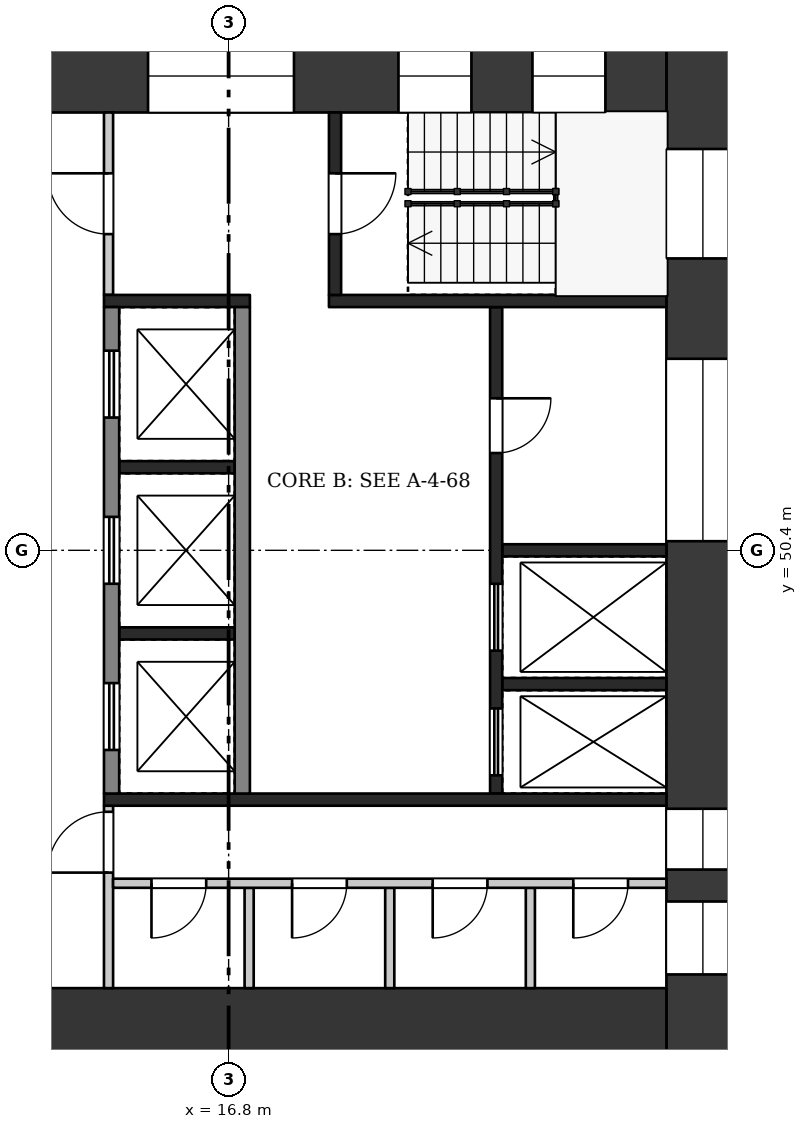
"""IFC4 building model, lengths in metres.
Left out: names, types, materials, properties, quantities, classifications, styles, units other than length and angle.
Written with IfcOpenShell. Run it as: python <this file> out.ifc"""

import sys

from ifc_helpers import new_model, si_unit, direction, frame, frame_2d, origin, place, context, subcontext, project, spatial, rectangle, extrude, element, fill, save


model = new_model("IFC4")
c1 = context("Model", 3, precision=1e-05, world=origin(), true_north=direction((0.0, 1.0)))
c2 = subcontext(c1, "Body", "Model", "MODEL_VIEW")
j1 = project(units=[si_unit("LENGTHUNIT", "METRE"), si_unit("PLANEANGLEUNIT", "RADIAN")], contexts=[c1])
p1 = place(None, origin())
s1 = spatial("IfcSite", under=j1, at=p1, CompositionType="ELEMENT")
p2 = place(p1, origin())
s2 = spatial("IfcBuilding", under=s1, at=p2, CompositionType="ELEMENT")
p3 = place(p2, frame((0.0, 0.0, 235.2)))
s3 = spatial("IfcBuildingStorey", under=s2, at=p3, CompositionType="ELEMENT", Elevation=235.2)
p4 = place(p3, frame((24.6, 58.8, 0.0), z_axis=(0.0, 0.0, 1.0), x_axis=(0.0, -1.0, 0.0)))
e1 = element("IfcWall", 1, at=p4, inside=s3, PredefinedType="SHEAR", context=c2, shape_type="SweptSolid", body=[
    extrude(rectangle(XDim=16.8, YDim=1.2, at=frame_2d((8.4, 0.0))), origin(), (0.0, 0.0, 1.0), 3.22),
])
p5 = place(p4, frame((1.8, 0.0, 0.5)))
e2 = element("IfcOpeningElement", 2, at=p5, cuts=e1, PredefinedType="OPENING", context=c2, shape_type="SweptSolid", body=[
    extrude(rectangle(XDim=1.8, YDim=2.4, at=frame_2d((0.9, 1.2))), frame((0.0, 0.61, 0.0), z_axis=(0.0, -1.0, 0.0), x_axis=(1.0, 0.0, 0.0)), (0.0, 0.0, 1.0), 1.22),
])
p6 = place(p4, frame((5.25, 0.0, 1.6)))
e3 = element("IfcOpeningElement", 3, at=p6, cuts=e1, PredefinedType="OPENING", context=c2, shape_type="SweptSolid", body=[
    extrude(rectangle(XDim=3.0, YDim=1.2, at=frame_2d((1.5, 0.6))), frame((0.0, 0.61, 0.0), z_axis=(0.0, -1.0, 0.0), x_axis=(1.0, 0.0, 0.0)), (0.0, 0.0, 1.0), 1.22),
])
p7 = place(p4, frame((12.65, 0.0, 0.6)))
e4 = element("IfcOpeningElement", 4, at=p7, cuts=e1, PredefinedType="OPENING", context=c2, shape_type="SweptSolid", body=[
    extrude(rectangle(XDim=1.0, YDim=2.1, at=frame_2d((0.5, 1.05))), frame((0.0, 0.61, 0.0), z_axis=(0.0, -1.0, 0.0), x_axis=(1.0, 0.0, 0.0)), (0.0, 0.0, 1.0), 1.22),
])
p8 = place(p4, frame((14.175, 0.0, 1.6)))
e5 = element("IfcOpeningElement", 5, at=p8, cuts=e1, PredefinedType="OPENING", context=c2, shape_type="SweptSolid", body=[
    extrude(rectangle(XDim=1.2, YDim=1.2, at=frame_2d((0.6, 0.6))), frame((0.0, 0.61, 0.0), z_axis=(0.0, -1.0, 0.0), x_axis=(1.0, 0.0, 0.0)), (0.0, 0.0, 1.0), 1.22),
])
p9 = place(p3, frame((9.6, 58.2, 0.0), z_axis=(0.0, 0.0, 1.0), x_axis=(1.0, 0.0, 0.0)))
e6 = element("IfcWall", 6, at=p9, inside=s3, PredefinedType="SHEAR", context=c2, shape_type="SweptSolid", body=[
    extrude(rectangle(XDim=14.4, YDim=1.2, at=frame_2d((7.2, 0.0))), origin(), (0.0, 0.0, 1.0), 3.22),
])
p10 = place(p9, frame((1.105, 0.0, 0.6)))
e7 = element("IfcOpeningElement", 7, at=p10, cuts=e6, PredefinedType="OPENING", context=c2, shape_type="SweptSolid", body=[
    extrude(rectangle(XDim=3.0, YDim=2.1, at=frame_2d((1.5, 1.05))), frame((0.0, 0.61, 0.0), z_axis=(0.0, -1.0, 0.0), x_axis=(1.0, 0.0, 0.0)), (0.0, 0.0, 1.0), 1.22),
])
p11 = place(p9, frame((5.875, 0.0, 0.6)))
e8 = element("IfcOpeningElement", 8, at=p11, cuts=e6, PredefinedType="OPENING", context=c2, shape_type="SweptSolid", body=[
    extrude(rectangle(XDim=2.4, YDim=2.1, at=frame_2d((1.2, 1.05))), frame((0.0, 0.61, 0.0), z_axis=(0.0, -1.0, 0.0), x_axis=(1.0, 0.0, 0.0)), (0.0, 0.0, 1.0), 1.22),
])
p12 = place(p9, frame((9.993, 0.0, 0.5)))
e9 = element("IfcOpeningElement", 9, at=p12, cuts=e6, PredefinedType="OPENING", context=c2, shape_type="SweptSolid", body=[
    extrude(rectangle(XDim=1.2, YDim=2.4, at=frame_2d((0.6, 1.2))), frame((0.0, 0.61, 0.0), z_axis=(0.0, -1.0, 0.0), x_axis=(1.0, 0.0, 0.0)), (0.0, 0.0, 1.0), 1.22),
])
p13 = place(p9, frame((12.197, 0.0, 0.5)))
e10 = element("IfcOpeningElement", 10, at=p13, cuts=e6, PredefinedType="OPENING", context=c2, shape_type="SweptSolid", body=[
    extrude(rectangle(XDim=1.2, YDim=2.4, at=frame_2d((0.6, 1.2))), frame((0.0, 0.61, 0.0), z_axis=(0.0, -1.0, 0.0), x_axis=(1.0, 0.0, 0.0)), (0.0, 0.0, 1.0), 1.22),
])
p14 = place(p3, frame((9.6, 42.6, 0.0), z_axis=(0.0, 0.0, 1.0), x_axis=(1.0, 0.0, 0.0)))
e11 = element("IfcWall", 11, at=p14, inside=s3, PredefinedType="SHEAR", context=c2, shape_type="SweptSolid", body=[
    extrude(rectangle(XDim=14.4, YDim=1.2, at=frame_2d((7.2, 0.0))), origin(), (0.0, 0.0, 1.0), 3.22),
])
p15 = place(p14, frame((2.1, 0.0, 0.0)))
e12 = element("IfcOpeningElement", 12, at=p15, cuts=e11, PredefinedType="OPENING", context=c2, shape_type="SweptSolid", body=[
    extrude(rectangle(XDim=1.8, YDim=2.1, at=frame_2d((0.9, 1.05))), frame((0.0, 0.61, 0.0), z_axis=(0.0, -1.0, 0.0), x_axis=(1.0, 0.0, 0.0)), (0.0, 0.0, 1.0), 1.22),
])
for number, where, z_axis, x_axis in (
    (13, (15.0, 51.767, 0.0), (0.0, 0.0, 1.0), (1.0, 0.0, 0.0)),
    (14, (15.0, 49.033, 0.0), (0.0, 0.0, 1.0), (1.0, 0.0, 0.0)),
):
    element("IfcWall", number, at=place(p3, frame(where, z_axis=z_axis, x_axis=x_axis)), inside=s3, PredefinedType="SHEAR", context=c2, shape_type="SweptSolid", body=[
        extrude(rectangle(XDim=1.9, YDim=0.2, at=frame_2d((0.95, 0.0))), origin(), (0.0, 0.0, 1.0), 3.22),
    ])
p16 = place(p3, frame((14.875, 54.4, 0.0), z_axis=(0.0, 0.0, 1.0), x_axis=(0.0, -1.0, 0.0)))
e15 = element("IfcWall", 15, at=p16, inside=s3, PredefinedType="SHEAR", context=c2, shape_type="SweptSolid", body=[
    extrude(rectangle(XDim=8.0, YDim=0.25, at=frame_2d((4.0, 0.0))), origin(), (0.0, 0.0, 1.0), 3.22),
])
p17 = place(p16, frame((0.717, 0.0, 0.0)))
e16 = element("IfcOpeningElement", 16, at=p17, cuts=e15, PredefinedType="OPENING", context=c2, shape_type="SweptSolid", body=[
    extrude(rectangle(XDim=1.1, YDim=2.1, at=frame_2d((0.55, 1.05))), frame((0.0, 0.135, 0.0), z_axis=(0.0, -1.0, 0.0), x_axis=(1.0, 0.0, 0.0)), (0.0, 0.0, 1.0), 0.27),
])
p18 = place(p16, frame((3.45, 0.0, 0.0)))
e17 = element("IfcOpeningElement", 17, at=p18, cuts=e15, PredefinedType="OPENING", context=c2, shape_type="SweptSolid", body=[
    extrude(rectangle(XDim=1.1, YDim=2.1, at=frame_2d((0.55, 1.05))), frame((0.0, 0.135, 0.0), z_axis=(0.0, -1.0, 0.0), x_axis=(1.0, 0.0, 0.0)), (0.0, 0.0, 1.0), 0.27),
])
p19 = place(p16, frame((6.183, 0.0, 0.0)))
e18 = element("IfcOpeningElement", 18, at=p19, cuts=e15, PredefinedType="OPENING", context=c2, shape_type="SweptSolid", body=[
    extrude(rectangle(XDim=1.1, YDim=2.1, at=frame_2d((0.55, 1.05))), frame((0.0, 0.135, 0.0), z_axis=(0.0, -1.0, 0.0), x_axis=(1.0, 0.0, 0.0)), (0.0, 0.0, 1.0), 0.27),
])
p20 = place(p3, frame((17.025, 54.4, 0.0), z_axis=(0.0, 0.0, 1.0), x_axis=(0.0, -1.0, 0.0)))
e19 = element("IfcWall", 19, at=p20, inside=s3, PredefinedType="SHEAR", context=c2, shape_type="SweptSolid", body=[
    extrude(rectangle(XDim=8.0, YDim=0.25, at=frame_2d((4.0, 0.0))), origin(), (0.0, 0.0, 1.0), 3.22),
])
for number, where, z_axis, x_axis in (
    (20, (21.3, 50.4, 0.0), (0.0, 0.0, 1.0), (1.0, 0.0, 0.0)),
    (21, (21.3, 48.2, 0.0), (0.0, 0.0, 1.0), (1.0, 0.0, 0.0)),
):
    element("IfcWall", number, at=place(p3, frame(where, z_axis=z_axis, x_axis=x_axis)), inside=s3, PredefinedType="SHEAR", context=c2, shape_type="SweptSolid", body=[
        extrude(rectangle(XDim=2.7, YDim=0.2, at=frame_2d((1.35, 0.0))), origin(), (0.0, 0.0, 1.0), 3.22),
    ])
p21 = place(p3, frame((21.2, 54.4, 0.0), z_axis=(0.0, 0.0, 1.0), x_axis=(0.0, -1.0, 0.0)))
e22 = element("IfcWall", 22, at=p21, inside=s3, PredefinedType="SHEAR", context=c2, shape_type="SweptSolid", body=[
    extrude(rectangle(XDim=8.0, YDim=0.2, at=frame_2d((4.0, 0.0))), origin(), (0.0, 0.0, 1.0), 3.22),
])
p22 = place(p21, frame((1.5, 0.0, 0.0)))
e23 = element("IfcOpeningElement", 23, at=p22, cuts=e22, PredefinedType="OPENING", context=c2, shape_type="SweptSolid", body=[
    extrude(rectangle(XDim=0.9, YDim=2.1, at=frame_2d((0.45, 1.05))), frame((0.0, 0.11, 0.0), z_axis=(0.0, -1.0, 0.0), x_axis=(1.0, 0.0, 0.0)), (0.0, 0.0, 1.0), 0.22),
])
p23 = place(p21, frame((4.55, 0.0, 0.0)))
e24 = element("IfcOpeningElement", 24, at=p23, cuts=e22, PredefinedType="OPENING", context=c2, shape_type="SweptSolid", body=[
    extrude(rectangle(XDim=1.1, YDim=2.1, at=frame_2d((0.55, 1.05))), frame((0.0, 0.11, 0.0), z_axis=(0.0, -1.0, 0.0), x_axis=(1.0, 0.0, 0.0)), (0.0, 0.0, 1.0), 0.22),
])
p24 = place(p21, frame((6.6, 0.0, 0.0)))
e25 = element("IfcOpeningElement", 25, at=p24, cuts=e22, PredefinedType="OPENING", context=c2, shape_type="SweptSolid", body=[
    extrude(rectangle(XDim=1.1, YDim=2.1, at=frame_2d((0.55, 1.05))), frame((0.0, 0.11, 0.0), z_axis=(0.0, -1.0, 0.0), x_axis=(1.0, 0.0, 0.0)), (0.0, 0.0, 1.0), 0.22),
])
p25 = place(p3, frame((14.75, 54.5, 0.0), z_axis=(0.0, 0.0, 1.0), x_axis=(1.0, 0.0, 0.0)))
e26 = element("IfcWall", 26, at=p25, inside=s3, PredefinedType="SHEAR", context=c2, shape_type="SweptSolid", body=[
    extrude(rectangle(XDim=2.4, YDim=0.2, at=frame_2d((1.2, 0.0))), origin(), (0.0, 0.0, 1.0), 3.22),
])
p26 = place(p3, frame((18.45, 54.5, 0.0), z_axis=(0.0, 0.0, 1.0), x_axis=(1.0, 0.0, 0.0)))
e27 = element("IfcWall", 27, at=p26, inside=s3, PredefinedType="SHEAR", context=c2, shape_type="SweptSolid", body=[
    extrude(rectangle(XDim=5.55, YDim=0.2, at=frame_2d((2.775, 0.0))), origin(), (0.0, 0.0, 1.0), 3.22),
])
p27 = place(p3, frame((14.825, 57.6, 0.0), z_axis=(0.0, 0.0, 1.0), x_axis=(0.0, -1.0, 0.0)))
e28 = element("IfcWall", 28, at=p27, inside=s3, PredefinedType="PARTITIONING", context=c2, shape_type="SweptSolid", body=[
    extrude(rectangle(XDim=3.0, YDim=0.15, at=frame_2d((1.5, 0.0))), origin(), (0.0, 0.0, 1.0), 3.22),
])
p28 = place(p27, frame((1.0, 0.0, 0.0)))
e29 = element("IfcOpeningElement", 29, at=p28, cuts=e28, PredefinedType="OPENING", context=c2, shape_type="SweptSolid", body=[
    extrude(rectangle(XDim=1.0, YDim=2.1, at=frame_2d((0.5, 1.05))), frame((0.0, 0.085, 0.0), z_axis=(0.0, -1.0, 0.0), x_axis=(1.0, 0.0, 0.0)), (0.0, 0.0, 1.0), 0.17),
])
p29 = place(p3, frame((18.55, 57.6, 0.0), z_axis=(0.0, 0.0, 1.0), x_axis=(0.0, -1.0, 0.0)))
e30 = element("IfcWall", 30, at=p29, inside=s3, PredefinedType="SHEAR", context=c2, shape_type="SweptSolid", body=[
    extrude(rectangle(XDim=3.0, YDim=0.2, at=frame_2d((1.5, 0.0))), origin(), (0.0, 0.0, 1.0), 3.22),
])
p30 = place(p29, frame((1.0, 0.0, 0.0)))
e31 = element("IfcOpeningElement", 31, at=p30, cuts=e30, PredefinedType="OPENING", context=c2, shape_type="SweptSolid", body=[
    extrude(rectangle(XDim=1.0, YDim=2.1, at=frame_2d((0.5, 1.05))), frame((0.0, 0.11, 0.0), z_axis=(0.0, -1.0, 0.0), x_axis=(1.0, 0.0, 0.0)), (0.0, 0.0, 1.0), 0.22),
])
p31 = place(p3, frame((14.75, 46.3, 0.0), z_axis=(0.0, 0.0, 1.0), x_axis=(1.0, 0.0, 0.0)))
e32 = element("IfcWall", 32, at=p31, inside=s3, PredefinedType="SHEAR", context=c2, shape_type="SweptSolid", body=[
    extrude(rectangle(XDim=9.25, YDim=0.2, at=frame_2d((4.625, 0.0))), origin(), (0.0, 0.0, 1.0), 3.22),
])
p32 = place(p3, frame((14.825, 46.2, 0.0), z_axis=(0.0, 0.0, 1.0), x_axis=(0.0, -1.0, 0.0)))
e33 = element("IfcWall", 33, at=p32, inside=s3, PredefinedType="PARTITIONING", context=c2, shape_type="SweptSolid", body=[
    extrude(rectangle(XDim=3.0, YDim=0.15, at=frame_2d((1.5, 0.0))), origin(), (0.0, 0.0, 1.0), 3.22),
])
p33 = place(p32, frame((0.1, 0.0, 0.0)))
e34 = element("IfcOpeningElement", 34, at=p33, cuts=e33, PredefinedType="OPENING", context=c2, shape_type="SweptSolid", body=[
    extrude(rectangle(XDim=1.0, YDim=2.1, at=frame_2d((0.5, 1.05))), frame((0.0, 0.085, 0.0), z_axis=(0.0, -1.0, 0.0), x_axis=(1.0, 0.0, 0.0)), (0.0, 0.0, 1.0), 0.17),
])
for number, where, z_axis, x_axis in (
    (35, (17.137, 44.85, 0.0), (0.0, 0.0, 1.0), (0.0, -1.0, 0.0)),
    (36, (19.45, 44.85, 0.0), (0.0, 0.0, 1.0), (0.0, -1.0, 0.0)),
    (37, (21.762, 44.85, 0.0), (0.0, 0.0, 1.0), (0.0, -1.0, 0.0)),
):
    element("IfcWall", number, at=place(p3, frame(where, z_axis=z_axis, x_axis=x_axis)), inside=s3, PredefinedType="PARTITIONING", context=c2, shape_type="SweptSolid", body=[
        extrude(rectangle(XDim=1.65, YDim=0.15, at=frame_2d((0.825, 0.0))), origin(), (0.0, 0.0, 1.0), 3.22),
    ])
p34 = place(p3, frame((14.9, 44.925, 0.0), z_axis=(0.0, 0.0, 1.0), x_axis=(1.0, 0.0, 0.0)))
e38 = element("IfcWall", 38, at=p34, inside=s3, PredefinedType="PARTITIONING", context=c2, shape_type="SweptSolid", body=[
    extrude(rectangle(XDim=9.1, YDim=0.15, at=frame_2d((4.55, 0.0))), origin(), (0.0, 0.0, 1.0), 3.22),
])
p35 = place(p34, frame((0.631, 0.0, 0.0)))
e39 = element("IfcOpeningElement", 39, at=p35, cuts=e38, PredefinedType="OPENING", context=c2, shape_type="SweptSolid", body=[
    extrude(rectangle(XDim=0.9, YDim=2.1, at=frame_2d((0.45, 1.05))), frame((0.0, 0.085, 0.0), z_axis=(0.0, -1.0, 0.0), x_axis=(1.0, 0.0, 0.0)), (0.0, 0.0, 1.0), 0.17),
])
p36 = place(p34, frame((2.944, 0.0, 0.0)))
e40 = element("IfcOpeningElement", 40, at=p36, cuts=e38, PredefinedType="OPENING", context=c2, shape_type="SweptSolid", body=[
    extrude(rectangle(XDim=0.9, YDim=2.1, at=frame_2d((0.45, 1.05))), frame((0.0, 0.085, 0.0), z_axis=(0.0, -1.0, 0.0), x_axis=(1.0, 0.0, 0.0)), (0.0, 0.0, 1.0), 0.17),
])
p37 = place(p34, frame((5.256, 0.0, 0.0)))
e41 = element("IfcOpeningElement", 41, at=p37, cuts=e38, PredefinedType="OPENING", context=c2, shape_type="SweptSolid", body=[
    extrude(rectangle(XDim=0.9, YDim=2.1, at=frame_2d((0.45, 1.05))), frame((0.0, 0.085, 0.0), z_axis=(0.0, -1.0, 0.0), x_axis=(1.0, 0.0, 0.0)), (0.0, 0.0, 1.0), 0.17),
])
p38 = place(p34, frame((7.569, 0.0, 0.0)))
e42 = element("IfcOpeningElement", 42, at=p38, cuts=e38, PredefinedType="OPENING", context=c2, shape_type="SweptSolid", body=[
    extrude(rectangle(XDim=0.9, YDim=2.1, at=frame_2d((0.45, 1.05))), frame((0.0, 0.085, 0.0), z_axis=(0.0, -1.0, 0.0), x_axis=(1.0, 0.0, 0.0)), (0.0, 0.0, 1.0), 0.17),
])
p39 = place(p17, origin())
e43 = element("IfcDoor", 43, at=p39, inside=s3, OperationType="DOUBLE_DOOR_SLIDING", PredefinedType="DOOR", context=c2, shape_type="SweptSolid", body=[
    extrude(rectangle(XDim=1.1, YDim=2.1, at=frame_2d((0.55, 1.05))), frame((0.0, 0.025, 0.0), z_axis=(0.0, -1.0, 0.0), x_axis=(1.0, 0.0, 0.0)), (0.0, 0.0, 1.0), 0.05),
])
fill(e16, e43)
p40 = place(p18, origin())
e44 = element("IfcDoor", 44, at=p40, inside=s3, OperationType="DOUBLE_DOOR_SLIDING", PredefinedType="DOOR", context=c2, shape_type="SweptSolid", body=[
    extrude(rectangle(XDim=1.1, YDim=2.1, at=frame_2d((0.55, 1.05))), frame((0.0, 0.025, 0.0), z_axis=(0.0, -1.0, 0.0), x_axis=(1.0, 0.0, 0.0)), (0.0, 0.0, 1.0), 0.05),
])
fill(e17, e44)
p41 = place(p19, origin())
e45 = element("IfcDoor", 45, at=p41, inside=s3, OperationType="DOUBLE_DOOR_SLIDING", PredefinedType="DOOR", context=c2, shape_type="SweptSolid", body=[
    extrude(rectangle(XDim=1.1, YDim=2.1, at=frame_2d((0.55, 1.05))), frame((0.0, 0.025, 0.0), z_axis=(0.0, -1.0, 0.0), x_axis=(1.0, 0.0, 0.0)), (0.0, 0.0, 1.0), 0.05),
])
fill(e18, e45)
p42 = place(p22, origin())
e46 = element("IfcDoor", 46, at=p42, inside=s3, OperationType="SINGLE_SWING_LEFT", PredefinedType="DOOR", context=c2, shape_type="SweptSolid", body=[
    extrude(rectangle(XDim=0.9, YDim=2.1, at=frame_2d((0.45, 1.05))), frame((0.0, 0.025, 0.0), z_axis=(0.0, -1.0, 0.0), x_axis=(1.0, 0.0, 0.0)), (0.0, 0.0, 1.0), 0.05),
])
fill(e23, e46)
p43 = place(p23, origin())
e47 = element("IfcDoor", 47, at=p43, inside=s3, OperationType="DOUBLE_DOOR_SLIDING", PredefinedType="DOOR", context=c2, shape_type="SweptSolid", body=[
    extrude(rectangle(XDim=1.1, YDim=2.1, at=frame_2d((0.55, 1.05))), frame((0.0, 0.025, 0.0), z_axis=(0.0, -1.0, 0.0), x_axis=(1.0, 0.0, 0.0)), (0.0, 0.0, 1.0), 0.05),
])
fill(e24, e47)
p44 = place(p24, origin())
e48 = element("IfcDoor", 48, at=p44, inside=s3, OperationType="DOUBLE_DOOR_SLIDING", PredefinedType="DOOR", context=c2, shape_type="SweptSolid", body=[
    extrude(rectangle(XDim=1.1, YDim=2.1, at=frame_2d((0.55, 1.05))), frame((0.0, 0.025, 0.0), z_axis=(0.0, -1.0, 0.0), x_axis=(1.0, 0.0, 0.0)), (0.0, 0.0, 1.0), 0.05),
])
fill(e25, e48)
p45 = place(p28, frame((1.0, 0.0, 0.0), z_axis=(0.0, 0.0, 1.0), x_axis=(-1.0, 0.0, 0.0)))
e49 = element("IfcDoor", 49, at=p45, inside=s3, OperationType="SINGLE_SWING_RIGHT", PredefinedType="DOOR", context=c2, shape_type="SweptSolid", body=[
    extrude(rectangle(XDim=1.0, YDim=2.1, at=frame_2d((0.5, 1.05))), frame((0.0, 0.025, 0.0), z_axis=(0.0, -1.0, 0.0), x_axis=(1.0, 0.0, 0.0)), (0.0, 0.0, 1.0), 0.05),
])
fill(e29, e49)
p46 = place(p30, origin())
e50 = element("IfcDoor", 50, at=p46, inside=s3, OperationType="SINGLE_SWING_LEFT", PredefinedType="DOOR", context=c2, shape_type="SweptSolid", body=[
    extrude(rectangle(XDim=1.0, YDim=2.1, at=frame_2d((0.5, 1.05))), frame((0.0, 0.025, 0.0), z_axis=(0.0, -1.0, 0.0), x_axis=(1.0, 0.0, 0.0)), (0.0, 0.0, 1.0), 0.05),
])
fill(e31, e50)
p47 = place(p33, frame((1.0, 0.0, 0.0), z_axis=(0.0, 0.0, 1.0), x_axis=(-1.0, 0.0, 0.0)))
e51 = element("IfcDoor", 51, at=p47, inside=s3, OperationType="SINGLE_SWING_LEFT", PredefinedType="DOOR", context=c2, shape_type="SweptSolid", body=[
    extrude(rectangle(XDim=1.0, YDim=2.1, at=frame_2d((0.5, 1.05))), frame((0.0, 0.025, 0.0), z_axis=(0.0, -1.0, 0.0), x_axis=(1.0, 0.0, 0.0)), (0.0, 0.0, 1.0), 0.05),
])
fill(e34, e51)
p48 = place(p35, frame((0.9, 0.0, 0.0), z_axis=(0.0, 0.0, 1.0), x_axis=(-1.0, 0.0, 0.0)))
e52 = element("IfcDoor", 52, at=p48, inside=s3, OperationType="SINGLE_SWING_RIGHT", PredefinedType="DOOR", context=c2, shape_type="SweptSolid", body=[
    extrude(rectangle(XDim=0.9, YDim=2.1, at=frame_2d((0.45, 1.05))), frame((0.0, 0.025, 0.0), z_axis=(0.0, -1.0, 0.0), x_axis=(1.0, 0.0, 0.0)), (0.0, 0.0, 1.0), 0.05),
])
fill(e39, e52)
p49 = place(p36, frame((0.9, 0.0, 0.0), z_axis=(0.0, 0.0, 1.0), x_axis=(-1.0, 0.0, 0.0)))
e53 = element("IfcDoor", 53, at=p49, inside=s3, OperationType="SINGLE_SWING_RIGHT", PredefinedType="DOOR", context=c2, shape_type="SweptSolid", body=[
    extrude(rectangle(XDim=0.9, YDim=2.1, at=frame_2d((0.45, 1.05))), frame((0.0, 0.025, 0.0), z_axis=(0.0, -1.0, 0.0), x_axis=(1.0, 0.0, 0.0)), (0.0, 0.0, 1.0), 0.05),
])
fill(e40, e53)
p50 = place(p37, frame((0.9, 0.0, 0.0), z_axis=(0.0, 0.0, 1.0), x_axis=(-1.0, 0.0, 0.0)))
e54 = element("IfcDoor", 54, at=p50, inside=s3, OperationType="SINGLE_SWING_RIGHT", PredefinedType="DOOR", context=c2, shape_type="SweptSolid", body=[
    extrude(rectangle(XDim=0.9, YDim=2.1, at=frame_2d((0.45, 1.05))), frame((0.0, 0.025, 0.0), z_axis=(0.0, -1.0, 0.0), x_axis=(1.0, 0.0, 0.0)), (0.0, 0.0, 1.0), 0.05),
])
fill(e41, e54)
p51 = place(p38, frame((0.9, 0.0, 0.0), z_axis=(0.0, 0.0, 1.0), x_axis=(-1.0, 0.0, 0.0)))
e55 = element("IfcDoor", 55, at=p51, inside=s3, OperationType="SINGLE_SWING_RIGHT", PredefinedType="DOOR", context=c2, shape_type="SweptSolid", body=[
    extrude(rectangle(XDim=0.9, YDim=2.1, at=frame_2d((0.45, 1.05))), frame((0.0, 0.025, 0.0), z_axis=(0.0, -1.0, 0.0), x_axis=(1.0, 0.0, 0.0)), (0.0, 0.0, 1.0), 0.05),
])
fill(e42, e55)
p52 = place(p5, origin())
e56 = element("IfcWindow", 56, at=p52, inside=s3, PartitioningType="SINGLE_PANEL", PredefinedType="WINDOW", context=c2, shape_type="SweptSolid", body=[
    extrude(rectangle(XDim=1.8, YDim=2.4, at=frame_2d((0.9, 1.2))), frame((0.0, 0.03, 0.0), z_axis=(0.0, -1.0, 0.0), x_axis=(1.0, 0.0, 0.0)), (0.0, 0.0, 1.0), 0.06),
])
fill(e2, e56)
p53 = place(p6, origin())
e57 = element("IfcWindow", 57, at=p53, inside=s3, PartitioningType="SINGLE_PANEL", PredefinedType="WINDOW", context=c2, shape_type="SweptSolid", body=[
    extrude(rectangle(XDim=3.0, YDim=1.2, at=frame_2d((1.5, 0.6))), frame((0.0, 0.03, 0.0), z_axis=(0.0, -1.0, 0.0), x_axis=(1.0, 0.0, 0.0)), (0.0, 0.0, 1.0), 0.06),
])
fill(e3, e57)
p54 = place(p7, origin())
e58 = element("IfcWindow", 58, at=p54, inside=s3, PartitioningType="SINGLE_PANEL", PredefinedType="WINDOW", context=c2, shape_type="SweptSolid", body=[
    extrude(rectangle(XDim=1.0, YDim=2.1, at=frame_2d((0.5, 1.05))), frame((0.0, 0.03, 0.0), z_axis=(0.0, -1.0, 0.0), x_axis=(1.0, 0.0, 0.0)), (0.0, 0.0, 1.0), 0.06),
])
fill(e4, e58)
p55 = place(p8, origin())
e59 = element("IfcWindow", 59, at=p55, inside=s3, PartitioningType="SINGLE_PANEL", PredefinedType="WINDOW", context=c2, shape_type="SweptSolid", body=[
    extrude(rectangle(XDim=1.2, YDim=1.2, at=frame_2d((0.6, 0.6))), frame((0.0, 0.03, 0.0), z_axis=(0.0, -1.0, 0.0), x_axis=(1.0, 0.0, 0.0)), (0.0, 0.0, 1.0), 0.06),
])
fill(e5, e59)
p56 = place(p11, origin())
e60 = element("IfcWindow", 60, at=p56, inside=s3, PartitioningType="SINGLE_PANEL", PredefinedType="WINDOW", context=c2, shape_type="SweptSolid", body=[
    extrude(rectangle(XDim=2.4, YDim=2.1, at=frame_2d((1.2, 1.05))), frame((0.0, 0.03, 0.0), z_axis=(0.0, -1.0, 0.0), x_axis=(1.0, 0.0, 0.0)), (0.0, 0.0, 1.0), 0.06),
])
fill(e8, e60)
p57 = place(p12, origin())
e61 = element("IfcWindow", 61, at=p57, inside=s3, PartitioningType="SINGLE_PANEL", PredefinedType="WINDOW", context=c2, shape_type="SweptSolid", body=[
    extrude(rectangle(XDim=1.2, YDim=2.4, at=frame_2d((0.6, 1.2))), frame((0.0, 0.03, 0.0), z_axis=(0.0, -1.0, 0.0), x_axis=(1.0, 0.0, 0.0)), (0.0, 0.0, 1.0), 0.06),
])
fill(e9, e61)
p58 = place(p13, origin())
e62 = element("IfcWindow", 62, at=p58, inside=s3, PartitioningType="SINGLE_PANEL", PredefinedType="WINDOW", context=c2, shape_type="SweptSolid", body=[
    extrude(rectangle(XDim=1.2, YDim=2.4, at=frame_2d((0.6, 1.2))), frame((0.0, 0.03, 0.0), z_axis=(0.0, -1.0, 0.0), x_axis=(1.0, 0.0, 0.0)), (0.0, 0.0, 1.0), 0.06),
])
fill(e10, e62)
save(model, sys.argv[1])
